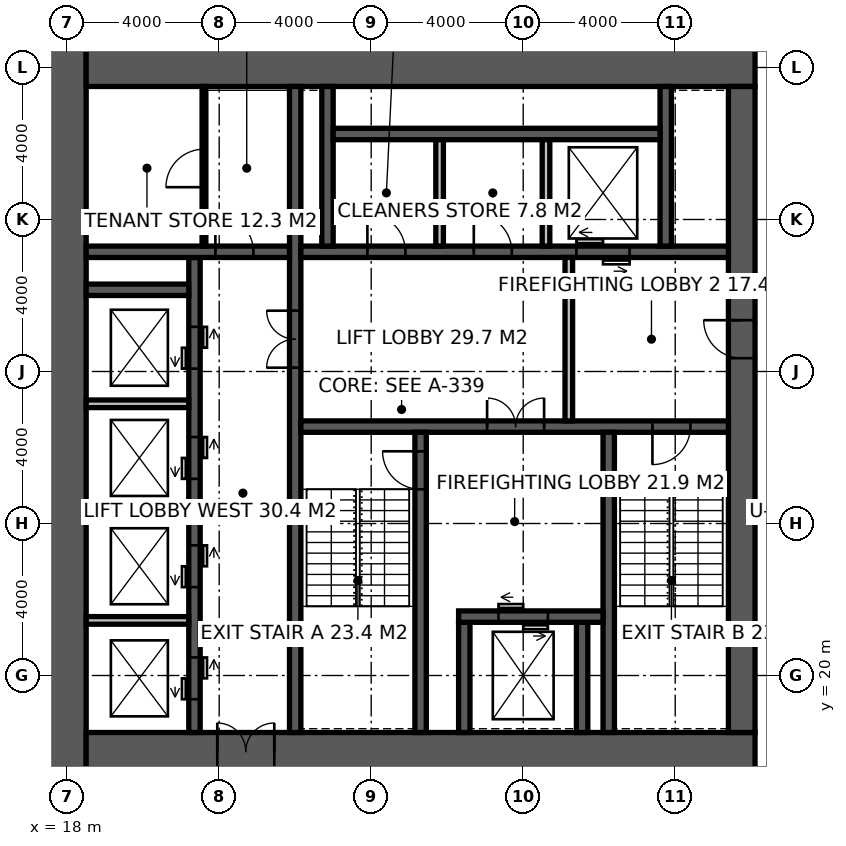
"""IFC4 building model, lengths in metres.
Left out: names, types, materials, properties, quantities, classifications, styles, units other than length and angle.
Written with IfcOpenShell. Run it as: python <this file> out.ifc"""

import sys

from ifc_helpers import new_model, si_unit, direction, frame, frame_2d, origin, place, context, subcontext, project, spatial, rectangle, extrude, element, fill, save


model = new_model("IFC4")
c1 = context("Model", 3, precision=1e-05, world=origin(), true_north=direction((0.0, 1.0)))
c2 = subcontext(c1, "Body", "Model", "MODEL_VIEW")
j1 = project(units=[si_unit("LENGTHUNIT", "METRE"), si_unit("PLANEANGLEUNIT", "RADIAN")], contexts=[c1])
p1 = place(None, origin())
s1 = spatial("IfcSite", under=j1, at=p1, CompositionType="ELEMENT")
p2 = place(p1, origin())
s2 = spatial("IfcBuilding", under=s1, at=p2, CompositionType="ELEMENT")
p3 = place(p2, frame((0.0, 0.0, 246.2)))
s3 = spatial("IfcBuildingStorey", under=s2, at=p3, CompositionType="ELEMENT", Elevation=246.2)
p4 = place(p3, frame((18.0, 17.5, -0.15), z_axis=(0.0, 0.0, 1.0), x_axis=(0.0, 1.0, 0.0)))
e1 = element("IfcWall", 1, at=p4, inside=s3, PredefinedType="SHEAR", context=c2, shape_type="SweptSolid", body=[
    extrude(rectangle(XDim=19.0, YDim=1.0, at=frame_2d((9.5, 0.0))), origin(), (0.0, 0.0, 1.0), 4.0),
])
p5 = place(p3, frame((18.5, 18.0, -0.15), z_axis=(0.0, 0.0, 1.0), x_axis=(1.0, 0.0, 0.0)))
e2 = element("IfcWall", 2, at=p5, inside=s3, PredefinedType="SHEAR", context=c2, shape_type="SweptSolid", body=[
    extrude(rectangle(XDim=17.6, YDim=1.0, at=frame_2d((8.8, 0.0))), origin(), (0.0, 0.0, 1.0), 4.0),
])
p6 = place(p5, frame((3.45, 0.0, 0.15)))
e3 = element("IfcOpeningElement", 3, at=p6, cuts=e2, PredefinedType="OPENING", context=c2, shape_type="SweptSolid", body=[
    extrude(rectangle(XDim=1.5, YDim=2.4, at=frame_2d((0.75, 1.2))), frame((0.0, 0.51, 0.0), z_axis=(0.0, -1.0, 0.0), x_axis=(1.0, 0.0, 0.0)), (0.0, 0.0, 1.0), 1.02),
])
p7 = place(p3, frame((18.5, 36.0, -0.15), z_axis=(0.0, 0.0, 1.0), x_axis=(1.0, 0.0, 0.0)))
e4 = element("IfcWall", 4, at=p7, inside=s3, PredefinedType="SHEAR", context=c2, shape_type="SweptSolid", body=[
    extrude(rectangle(XDim=17.6, YDim=1.0, at=frame_2d((8.8, 0.0))), origin(), (0.0, 0.0, 1.0), 4.0),
])
p8 = place(p3, frame((35.75, 18.5, -0.15), z_axis=(0.0, 0.0, 1.0), x_axis=(0.0, 1.0, 0.0)))
e5 = element("IfcWall", 5, at=p8, inside=s3, PredefinedType="SHEAR", context=c2, shape_type="SweptSolid", body=[
    extrude(rectangle(XDim=17.0, YDim=0.7, at=frame_2d((8.5, 0.0))), origin(), (0.0, 0.0, 1.0), 4.0),
])
p9 = place(p8, frame((9.85, 0.0, 0.15)))
e6 = element("IfcOpeningElement", 6, at=p9, cuts=e5, PredefinedType="OPENING", context=c2, shape_type="SweptSolid", body=[
    extrude(rectangle(XDim=1.0, YDim=2.2, at=frame_2d((0.5, 1.1))), frame((0.0, 0.36, 0.0), z_axis=(0.0, -1.0, 0.0), x_axis=(1.0, 0.0, 0.0)), (0.0, 0.0, 1.0), 0.72),
])
p10 = place(p3, frame((24.0, 18.5, -0.15), z_axis=(0.0, 0.0, 1.0), x_axis=(0.0, 1.0, 0.0)))
e7 = element("IfcWall", 7, at=p10, inside=s3, PredefinedType="SHEAR", context=c2, shape_type="SweptSolid", body=[
    extrude(rectangle(XDim=17.0, YDim=0.3, at=frame_2d((8.5, 0.0))), origin(), (0.0, 0.0, 1.0), 4.0),
])
p11 = place(p10, frame((9.6, 0.0, 0.15)))
e8 = element("IfcOpeningElement", 8, at=p11, cuts=e7, PredefinedType="OPENING", context=c2, shape_type="SweptSolid", body=[
    extrude(rectangle(XDim=1.5, YDim=2.4, at=frame_2d((0.75, 1.2))), frame((0.0, 0.16, 0.0), z_axis=(0.0, -1.0, 0.0), x_axis=(1.0, 0.0, 0.0)), (0.0, 0.0, 1.0), 0.32),
])
p12 = place(p3, frame((24.15, 26.55, -0.15), z_axis=(0.0, 0.0, 1.0), x_axis=(1.0, 0.0, 0.0)))
e9 = element("IfcWall", 9, at=p12, inside=s3, PredefinedType="SHEAR", context=c2, shape_type="SweptSolid", body=[
    extrude(rectangle(XDim=11.25, YDim=0.3, at=frame_2d((5.625, 0.0))), origin(), (0.0, 0.0, 1.0), 4.0),
])
p13 = place(p12, frame((9.25, 0.0, 0.15)))
e10 = element("IfcOpeningElement", 10, at=p13, cuts=e9, PredefinedType="OPENING", context=c2, shape_type="SweptSolid", body=[
    extrude(rectangle(XDim=1.0, YDim=2.2, at=frame_2d((0.5, 1.1))), frame((0.0, 0.16, 0.0), z_axis=(0.0, -1.0, 0.0), x_axis=(1.0, 0.0, 0.0)), (0.0, 0.0, 1.0), 0.32),
])
p14 = place(p12, frame((4.9, 0.0, 0.15)))
e11 = element("IfcOpeningElement", 11, at=p14, cuts=e9, PredefinedType="OPENING", context=c2, shape_type="SweptSolid", body=[
    extrude(rectangle(XDim=1.5, YDim=2.4, at=frame_2d((0.75, 1.2))), frame((0.0, 0.16, 0.0), z_axis=(0.0, -1.0, 0.0), x_axis=(1.0, 0.0, 0.0)), (0.0, 0.0, 1.0), 0.32),
])
p15 = place(p3, frame((27.3, 18.5, -0.15), z_axis=(0.0, 0.0, 1.0), x_axis=(0.0, 1.0, 0.0)))
e12 = element("IfcWall", 12, at=p15, inside=s3, PredefinedType="SHEAR", context=c2, shape_type="SweptSolid", body=[
    extrude(rectangle(XDim=7.9, YDim=0.3, at=frame_2d((3.95, 0.0))), origin(), (0.0, 0.0, 1.0), 4.0),
])
p16 = place(p15, frame((6.4, 0.0, 0.15)))
e13 = element("IfcOpeningElement", 13, at=p16, cuts=e12, PredefinedType="OPENING", context=c2, shape_type="SweptSolid", body=[
    extrude(rectangle(XDim=1.0, YDim=2.2, at=frame_2d((0.5, 1.1))), frame((0.0, 0.16, 0.0), z_axis=(0.0, -1.0, 0.0), x_axis=(1.0, 0.0, 0.0)), (0.0, 0.0, 1.0), 0.32),
])
p17 = place(p3, frame((32.25, 18.5, -0.15), z_axis=(0.0, 0.0, 1.0), x_axis=(0.0, 1.0, 0.0)))
e14 = element("IfcWall", 14, at=p17, inside=s3, PredefinedType="SHEAR", context=c2, shape_type="SweptSolid", body=[
    extrude(rectangle(XDim=7.9, YDim=0.3, at=frame_2d((3.95, 0.0))), origin(), (0.0, 0.0, 1.0), 4.0),
])
for number, where, z_axis, x_axis in (
    (15, (28.45, 18.5, -0.15), (0.0, 0.0, 1.0), (0.0, 1.0, 0.0)),
    (16, (31.55, 18.5, -0.15), (0.0, 0.0, 1.0), (0.0, 1.0, 0.0)),
):
    element("IfcWall", number, at=place(p3, frame(where, z_axis=z_axis, x_axis=x_axis)), inside=s3, PredefinedType="SHEAR", context=c2, shape_type="SweptSolid", body=[
        extrude(rectangle(XDim=2.9, YDim=0.3, at=frame_2d((1.45, 0.0))), origin(), (0.0, 0.0, 1.0), 4.0),
    ])
p18 = place(p3, frame((28.3, 21.55, -0.15), z_axis=(0.0, 0.0, 1.0), x_axis=(1.0, 0.0, 0.0)))
e17 = element("IfcWall", 17, at=p18, inside=s3, PredefinedType="SHEAR", context=c2, shape_type="SweptSolid", body=[
    extrude(rectangle(XDim=3.8, YDim=0.3, at=frame_2d((1.9, 0.0))), origin(), (0.0, 0.0, 1.0), 4.0),
])
p19 = place(p18, frame((1.05, 0.0, 0.15)))
e18 = element("IfcOpeningElement", 18, at=p19, cuts=e17, PredefinedType="OPENING", context=c2, shape_type="SweptSolid", body=[
    extrude(rectangle(XDim=1.3, YDim=2.4, at=frame_2d((0.65, 1.2))), frame((0.0, 0.16, 0.0), z_axis=(0.0, -1.0, 0.0), x_axis=(1.0, 0.0, 0.0)), (0.0, 0.0, 1.0), 0.32),
])
p20 = place(p3, frame((24.15, 31.15, -0.15), z_axis=(0.0, 0.0, 1.0), x_axis=(1.0, 0.0, 0.0)))
e19 = element("IfcWall", 19, at=p20, inside=s3, PredefinedType="SHEAR", context=c2, shape_type="SweptSolid", body=[
    extrude(rectangle(XDim=11.25, YDim=0.3, at=frame_2d((5.625, 0.0))), origin(), (0.0, 0.0, 1.0), 4.0),
])
p21 = place(p20, frame((1.75, 0.0, 0.15)))
e20 = element("IfcOpeningElement", 20, at=p21, cuts=e19, PredefinedType="OPENING", context=c2, shape_type="SweptSolid", body=[
    extrude(rectangle(XDim=1.0, YDim=2.2, at=frame_2d((0.5, 1.1))), frame((0.0, 0.16, 0.0), z_axis=(0.0, -1.0, 0.0), x_axis=(1.0, 0.0, 0.0)), (0.0, 0.0, 1.0), 0.32),
])
p22 = place(p20, frame((4.55, 0.0, 0.15)))
e21 = element("IfcOpeningElement", 21, at=p22, cuts=e19, PredefinedType="OPENING", context=c2, shape_type="SweptSolid", body=[
    extrude(rectangle(XDim=1.0, YDim=2.2, at=frame_2d((0.5, 1.1))), frame((0.0, 0.16, 0.0), z_axis=(0.0, -1.0, 0.0), x_axis=(1.0, 0.0, 0.0)), (0.0, 0.0, 1.0), 0.32),
])
p23 = place(p20, frame((7.25, 0.0, 0.15)))
e22 = element("IfcOpeningElement", 22, at=p23, cuts=e19, PredefinedType="OPENING", context=c2, shape_type="SweptSolid", body=[
    extrude(rectangle(XDim=1.4, YDim=2.4, at=frame_2d((0.7, 1.2))), frame((0.0, 0.16, 0.0), z_axis=(0.0, -1.0, 0.0), x_axis=(1.0, 0.0, 0.0)), (0.0, 0.0, 1.0), 0.32),
])
p24 = place(p3, frame((21.35, 18.5, -0.15), z_axis=(0.0, 0.0, 1.0), x_axis=(0.0, 1.0, 0.0)))
e23 = element("IfcWall", 23, at=p24, inside=s3, PredefinedType="SHEAR", context=c2, shape_type="SweptSolid", body=[
    extrude(rectangle(XDim=12.5, YDim=0.3, at=frame_2d((6.25, 0.0))), origin(), (0.0, 0.0, 1.0), 4.0),
])
p25 = place(p24, frame((0.875, 0.0, 0.15)))
e24 = element("IfcOpeningElement", 24, at=p25, cuts=e23, PredefinedType="OPENING", context=c2, shape_type="SweptSolid", body=[
    extrude(rectangle(XDim=1.1, YDim=2.2, at=frame_2d((0.55, 1.1))), frame((0.0, 0.16, 0.0), z_axis=(0.0, -1.0, 0.0), x_axis=(1.0, 0.0, 0.0)), (0.0, 0.0, 1.0), 0.32),
])
p26 = place(p24, frame((3.825, 0.0, 0.15)))
e25 = element("IfcOpeningElement", 25, at=p26, cuts=e23, PredefinedType="OPENING", context=c2, shape_type="SweptSolid", body=[
    extrude(rectangle(XDim=1.1, YDim=2.2, at=frame_2d((0.55, 1.1))), frame((0.0, 0.16, 0.0), z_axis=(0.0, -1.0, 0.0), x_axis=(1.0, 0.0, 0.0)), (0.0, 0.0, 1.0), 0.32),
])
p27 = place(p24, frame((6.675, 0.0, 0.15)))
e26 = element("IfcOpeningElement", 26, at=p27, cuts=e23, PredefinedType="OPENING", context=c2, shape_type="SweptSolid", body=[
    extrude(rectangle(XDim=1.1, YDim=2.2, at=frame_2d((0.55, 1.1))), frame((0.0, 0.16, 0.0), z_axis=(0.0, -1.0, 0.0), x_axis=(1.0, 0.0, 0.0)), (0.0, 0.0, 1.0), 0.32),
])
p28 = place(p24, frame((9.575, 0.0, 0.15)))
e27 = element("IfcOpeningElement", 27, at=p28, cuts=e23, PredefinedType="OPENING", context=c2, shape_type="SweptSolid", body=[
    extrude(rectangle(XDim=1.1, YDim=2.2, at=frame_2d((0.55, 1.1))), frame((0.0, 0.16, 0.0), z_axis=(0.0, -1.0, 0.0), x_axis=(1.0, 0.0, 0.0)), (0.0, 0.0, 1.0), 0.32),
])
p29 = place(p3, frame((18.5, 31.15, -0.15), z_axis=(0.0, 0.0, 1.0), x_axis=(1.0, 0.0, 0.0)))
e28 = element("IfcWall", 28, at=p29, inside=s3, PredefinedType="SHEAR", context=c2, shape_type="SweptSolid", body=[
    extrude(rectangle(XDim=5.35, YDim=0.3, at=frame_2d((2.675, 0.0))), origin(), (0.0, 0.0, 1.0), 4.0),
])
p30 = place(p29, frame((3.4, 0.0, 0.15)))
e29 = element("IfcOpeningElement", 29, at=p30, cuts=e28, PredefinedType="OPENING", context=c2, shape_type="SweptSolid", body=[
    extrude(rectangle(XDim=1.0, YDim=2.2, at=frame_2d((0.5, 1.1))), frame((0.0, 0.16, 0.0), z_axis=(0.0, -1.0, 0.0), x_axis=(1.0, 0.0, 0.0)), (0.0, 0.0, 1.0), 0.32),
])
p31 = place(p3, frame((18.5, 30.15, -0.15), z_axis=(0.0, 0.0, 1.0), x_axis=(1.0, 0.0, 0.0)))
e30 = element("IfcWall", 30, at=p31, inside=s3, PredefinedType="SHEAR", context=c2, shape_type="SweptSolid", body=[
    extrude(rectangle(XDim=2.7, YDim=0.3, at=frame_2d((1.35, 0.0))), origin(), (0.0, 0.0, 1.0), 4.0),
])
for number, where, z_axis, x_axis in (
    (31, (24.85, 31.3, -0.15), (0.0, 0.0, 1.0), (0.0, 1.0, 0.0)),
    (32, (33.75, 31.3, -0.15), (0.0, 0.0, 1.0), (0.0, 1.0, 0.0)),
):
    element("IfcWall", number, at=place(p3, frame(where, z_axis=z_axis, x_axis=x_axis)), inside=s3, PredefinedType="SHEAR", context=c2, shape_type="SweptSolid", body=[
        extrude(rectangle(XDim=4.2, YDim=0.3, at=frame_2d((2.1, 0.0))), origin(), (0.0, 0.0, 1.0), 4.0),
    ])
p32 = place(p3, frame((25.0, 34.25, -0.15), z_axis=(0.0, 0.0, 1.0), x_axis=(1.0, 0.0, 0.0)))
e33 = element("IfcWall", 33, at=p32, inside=s3, PredefinedType="SHEAR", context=c2, shape_type="SweptSolid", body=[
    extrude(rectangle(XDim=8.6, YDim=0.3, at=frame_2d((4.3, 0.0))), origin(), (0.0, 0.0, 1.0), 4.0),
])
for number, where, z_axis, x_axis in (
    (34, (27.8, 31.3, -0.15), (0.0, 0.0, 1.0), (0.0, 1.0, 0.0)),
    (35, (30.6, 31.3, -0.15), (0.0, 0.0, 1.0), (0.0, 1.0, 0.0)),
):
    element("IfcWall", number, at=place(p3, frame(where, z_axis=z_axis, x_axis=x_axis)), inside=s3, PredefinedType="SOLIDWALL", context=c2, shape_type="SweptSolid", body=[
        extrude(rectangle(XDim=2.8, YDim=0.2, at=frame_2d((1.4, 0.0))), origin(), (0.0, 0.0, 1.0), 4.0),
    ])
for number, where, z_axis, x_axis in (
    (36, (18.5, 21.45, -0.15), (0.0, 0.0, 1.0), (1.0, 0.0, 0.0)),
    (37, (18.5, 24.3, -0.15), (0.0, 0.0, 1.0), (1.0, 0.0, 0.0)),
    (38, (18.5, 27.15, -0.15), (0.0, 0.0, 1.0), (1.0, 0.0, 0.0)),
):
    element("IfcWall", number, at=place(p3, frame(where, z_axis=z_axis, x_axis=x_axis)), inside=s3, PredefinedType="SOLIDWALL", context=c2, shape_type="SweptSolid", body=[
        extrude(rectangle(XDim=2.7, YDim=0.2, at=frame_2d((1.35, 0.0))), origin(), (0.0, 0.0, 1.0), 4.0),
    ])
p33 = place(p3, frame((31.2, 26.7, 0.0), z_axis=(0.0, 0.0, 1.0), x_axis=(0.0, 1.0, 0.0)))
e39 = element("IfcWall", 39, at=p33, inside=s3, PredefinedType="SOLIDWALL", context=c2, shape_type="SweptSolid", body=[
    extrude(rectangle(XDim=4.3, YDim=0.2, at=frame_2d((2.15, 0.0))), origin(), (0.0, 0.0, 1.0), 3.85),
])
p34 = place(p3, frame((21.6, 31.3, 0.0), z_axis=(0.0, 0.0, 1.0), x_axis=(0.0, 1.0, 0.0)))
e40 = element("IfcWall", 40, at=p34, inside=s3, PredefinedType="PARTITIONING", context=c2, shape_type="SweptSolid", body=[
    extrude(rectangle(XDim=4.2, YDim=0.1, at=frame_2d((2.1, 0.0))), origin(), (0.0, 0.0, 1.0), 3.85),
])
p35 = place(p34, frame((1.55, 0.0, 0.0)))
e41 = element("IfcOpeningElement", 41, at=p35, cuts=e40, PredefinedType="OPENING", context=c2, shape_type="SweptSolid", body=[
    extrude(rectangle(XDim=1.0, YDim=2.2, at=frame_2d((0.5, 1.1))), frame((0.0, 0.06, 0.0), z_axis=(0.0, -1.0, 0.0), x_axis=(1.0, 0.0, 0.0)), (0.0, 0.0, 1.0), 0.12),
])
p36 = place(p16, origin())
e42 = element("IfcDoor", 42, at=p36, inside=s3, OperationType="SINGLE_SWING_RIGHT", PredefinedType="DOOR", context=c2, shape_type="SweptSolid", body=[
    extrude(rectangle(XDim=1.0, YDim=2.2, at=frame_2d((0.5, 1.1))), frame((0.0, 0.025, 0.0), z_axis=(0.0, -1.0, 0.0), x_axis=(1.0, 0.0, 0.0)), (0.0, 0.0, 1.0), 0.05),
])
fill(e13, e42)
p37 = place(p13, frame((1.0, 0.0, 0.0), z_axis=(0.0, 0.0, 1.0), x_axis=(-1.0, 0.0, 0.0)))
e43 = element("IfcDoor", 43, at=p37, inside=s3, OperationType="SINGLE_SWING_RIGHT", PredefinedType="DOOR", context=c2, shape_type="SweptSolid", body=[
    extrude(rectangle(XDim=1.0, YDim=2.2, at=frame_2d((0.5, 1.1))), frame((0.0, 0.025, 0.0), z_axis=(0.0, -1.0, 0.0), x_axis=(1.0, 0.0, 0.0)), (0.0, 0.0, 1.0), 0.05),
])
fill(e10, e43)
p38 = place(p9, origin())
e44 = element("IfcDoor", 44, at=p38, inside=s3, OperationType="SINGLE_SWING_RIGHT", PredefinedType="DOOR", context=c2, shape_type="SweptSolid", body=[
    extrude(rectangle(XDim=1.0, YDim=2.2, at=frame_2d((0.5, 1.1))), frame((0.0, 0.025, 0.0), z_axis=(0.0, -1.0, 0.0), x_axis=(1.0, 0.0, 0.0)), (0.0, 0.0, 1.0), 0.05),
])
fill(e6, e44)
p39 = place(p14, origin())
e45 = element("IfcDoor", 45, at=p39, inside=s3, OperationType="DOUBLE_DOOR_DOUBLE_SWING", PredefinedType="DOOR", context=c2, shape_type="SweptSolid", body=[
    extrude(rectangle(XDim=1.5, YDim=2.4, at=frame_2d((0.75, 1.2))), frame((0.0, 0.025, 0.0), z_axis=(0.0, -1.0, 0.0), x_axis=(1.0, 0.0, 0.0)), (0.0, 0.0, 1.0), 0.05),
])
fill(e11, e45)
p40 = place(p11, origin())
e46 = element("IfcDoor", 46, at=p40, inside=s3, OperationType="DOUBLE_DOOR_DOUBLE_SWING", PredefinedType="DOOR", context=c2, shape_type="SweptSolid", body=[
    extrude(rectangle(XDim=1.5, YDim=2.4, at=frame_2d((0.75, 1.2))), frame((0.0, 0.025, 0.0), z_axis=(0.0, -1.0, 0.0), x_axis=(1.0, 0.0, 0.0)), (0.0, 0.0, 1.0), 0.05),
])
fill(e8, e46)
p41 = place(p30, origin())
e47 = element("IfcDoor", 47, at=p41, inside=s3, OperationType="SINGLE_SWING_LEFT", PredefinedType="DOOR", context=c2, shape_type="SweptSolid", body=[
    extrude(rectangle(XDim=1.0, YDim=2.2, at=frame_2d((0.5, 1.1))), frame((0.0, 0.025, 0.0), z_axis=(0.0, -1.0, 0.0), x_axis=(1.0, 0.0, 0.0)), (0.0, 0.0, 1.0), 0.05),
])
fill(e29, e47)
p42 = place(p35, origin())
e48 = element("IfcDoor", 48, at=p42, inside=s3, OperationType="SINGLE_SWING_LEFT", PredefinedType="DOOR", context=c2, shape_type="SweptSolid", body=[
    extrude(rectangle(XDim=1.0, YDim=2.2, at=frame_2d((0.5, 1.1))), frame((0.0, 0.025, 0.0), z_axis=(0.0, -1.0, 0.0), x_axis=(1.0, 0.0, 0.0)), (0.0, 0.0, 1.0), 0.05),
])
fill(e41, e48)
p43 = place(p21, origin())
e49 = element("IfcDoor", 49, at=p43, inside=s3, OperationType="SINGLE_SWING_LEFT", PredefinedType="DOOR", context=c2, shape_type="SweptSolid", body=[
    extrude(rectangle(XDim=1.0, YDim=2.2, at=frame_2d((0.5, 1.1))), frame((0.0, 0.025, 0.0), z_axis=(0.0, -1.0, 0.0), x_axis=(1.0, 0.0, 0.0)), (0.0, 0.0, 1.0), 0.05),
])
fill(e20, e49)
p44 = place(p22, origin())
e50 = element("IfcDoor", 50, at=p44, inside=s3, OperationType="SINGLE_SWING_LEFT", PredefinedType="DOOR", context=c2, shape_type="SweptSolid", body=[
    extrude(rectangle(XDim=1.0, YDim=2.2, at=frame_2d((0.5, 1.1))), frame((0.0, 0.025, 0.0), z_axis=(0.0, -1.0, 0.0), x_axis=(1.0, 0.0, 0.0)), (0.0, 0.0, 1.0), 0.05),
])
fill(e21, e50)
p45 = place(p6, origin())
e51 = element("IfcDoor", 51, at=p45, inside=s3, OperationType="DOUBLE_DOOR_DOUBLE_SWING", PredefinedType="DOOR", context=c2, shape_type="SweptSolid", body=[
    extrude(rectangle(XDim=1.5, YDim=2.4, at=frame_2d((0.75, 1.2))), frame((0.0, 0.025, 0.0), z_axis=(0.0, -1.0, 0.0), x_axis=(1.0, 0.0, 0.0)), (0.0, 0.0, 1.0), 0.05),
])
fill(e3, e51)
p46 = place(p19, origin())
e52 = element("IfcDoor", 52, at=p46, inside=s3, OperationType="DOUBLE_DOOR_SLIDING", PredefinedType="DOOR", context=c2, shape_type="SweptSolid", body=[
    extrude(rectangle(XDim=1.3, YDim=2.4, at=frame_2d((0.65, 1.2))), frame((0.0, 0.025, 0.0), z_axis=(0.0, -1.0, 0.0), x_axis=(1.0, 0.0, 0.0)), (0.0, 0.0, 1.0), 0.05),
])
fill(e18, e52)
p47 = place(p23, origin())
e53 = element("IfcDoor", 53, at=p47, inside=s3, OperationType="DOUBLE_DOOR_SLIDING", PredefinedType="DOOR", context=c2, shape_type="SweptSolid", body=[
    extrude(rectangle(XDim=1.4, YDim=2.4, at=frame_2d((0.7, 1.2))), frame((0.0, 0.025, 0.0), z_axis=(0.0, -1.0, 0.0), x_axis=(1.0, 0.0, 0.0)), (0.0, 0.0, 1.0), 0.05),
])
fill(e22, e53)
p48 = place(p25, origin())
e54 = element("IfcDoor", 54, at=p48, inside=s3, OperationType="DOUBLE_DOOR_SLIDING", PredefinedType="DOOR", context=c2, shape_type="SweptSolid", body=[
    extrude(rectangle(XDim=1.1, YDim=2.2, at=frame_2d((0.55, 1.1))), frame((0.0, 0.025, 0.0), z_axis=(0.0, -1.0, 0.0), x_axis=(1.0, 0.0, 0.0)), (0.0, 0.0, 1.0), 0.05),
])
fill(e24, e54)
p49 = place(p26, origin())
e55 = element("IfcDoor", 55, at=p49, inside=s3, OperationType="DOUBLE_DOOR_SLIDING", PredefinedType="DOOR", context=c2, shape_type="SweptSolid", body=[
    extrude(rectangle(XDim=1.1, YDim=2.2, at=frame_2d((0.55, 1.1))), frame((0.0, 0.025, 0.0), z_axis=(0.0, -1.0, 0.0), x_axis=(1.0, 0.0, 0.0)), (0.0, 0.0, 1.0), 0.05),
])
fill(e25, e55)
p50 = place(p27, origin())
e56 = element("IfcDoor", 56, at=p50, inside=s3, OperationType="DOUBLE_DOOR_SLIDING", PredefinedType="DOOR", context=c2, shape_type="SweptSolid", body=[
    extrude(rectangle(XDim=1.1, YDim=2.2, at=frame_2d((0.55, 1.1))), frame((0.0, 0.025, 0.0), z_axis=(0.0, -1.0, 0.0), x_axis=(1.0, 0.0, 0.0)), (0.0, 0.0, 1.0), 0.05),
])
fill(e26, e56)
p51 = place(p28, origin())
e57 = element("IfcDoor", 57, at=p51, inside=s3, OperationType="DOUBLE_DOOR_SLIDING", PredefinedType="DOOR", context=c2, shape_type="SweptSolid", body=[
    extrude(rectangle(XDim=1.1, YDim=2.2, at=frame_2d((0.55, 1.1))), frame((0.0, 0.025, 0.0), z_axis=(0.0, -1.0, 0.0), x_axis=(1.0, 0.0, 0.0)), (0.0, 0.0, 1.0), 0.05),
])
fill(e27, e57)
save(model, sys.argv[1])
